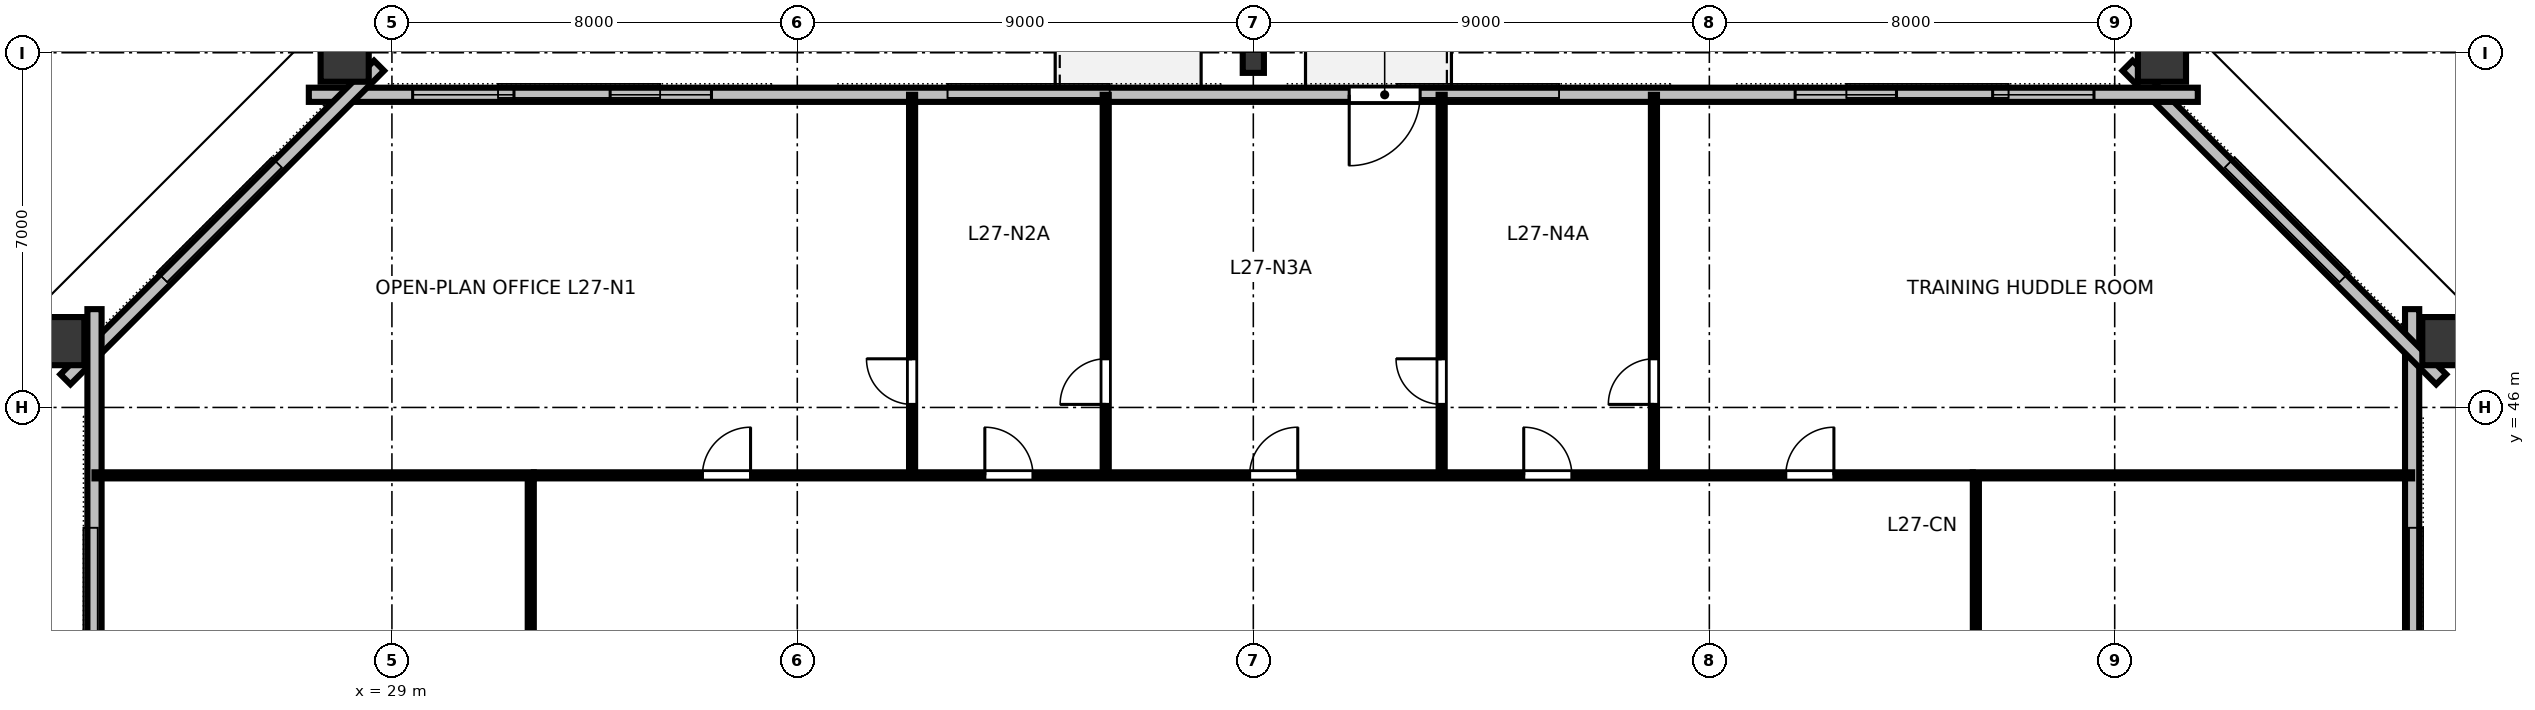
"""IFC4 building model, lengths in metres.
Left out: names, types, materials, properties, quantities, classifications, styles, units other than length and angle.
Written with IfcOpenShell. Run it as: python <this file> out.ifc"""

import sys

from ifc_helpers import new_model, si_unit, direction, frame, frame_2d, origin, origin_2d, place, context, subcontext, project, spatial, rectangle, hollow_rectangle, i_section, extrude, element, fill, save


model = new_model("IFC4")
c1 = context("Model", 3, precision=1e-05, world=origin(), true_north=direction((0.0, 1.0)))
c2 = subcontext(c1, "Body", "Model", "MODEL_VIEW")
j1 = project(units=[si_unit("LENGTHUNIT", "METRE"), si_unit("PLANEANGLEUNIT", "RADIAN")], contexts=[c1])
p1 = place(None, origin())
s1 = spatial("IfcSite", under=j1, at=p1, CompositionType="ELEMENT")
p2 = place(p1, origin())
s2 = spatial("IfcBuilding", under=s1, at=p2, CompositionType="ELEMENT")
p3 = place(p2, frame((0.0, 0.0, 106.0)))
s3 = spatial("IfcBuildingStorey", under=s2, at=p3, CompositionType="ELEMENT", Elevation=106.0)
for number, where, z_axis, x_axis in (
    (1, (69.646, 47.309, 0.0), (0.0, 0.0, 1.0), (0.0, 1.0, 0.0)),
    (2, (63.933, 53.002, 0.0), (0.0, 0.0, 1.0), (1.0, 0.0, 0.0)),
):
    element("IfcColumn", number, at=place(p3, frame(where, z_axis=z_axis, x_axis=x_axis)), inside=s3, PredefinedType="COLUMN", context=c2, shape_type="SweptSolid", body=[
        extrude(hollow_rectangle(XDim=0.95, YDim=1.15, WallThickness=0.06, at=origin_2d()), origin(), (0.0, 0.0, 1.0), 3.358),
    ])
p4 = place(p3, frame((46.0, 52.83, 0.0), z_axis=(0.0, 0.0, 1.0), x_axis=(1.0, 0.0, 0.0)))
e3 = element("IfcColumn", 3, at=p4, inside=s3, PredefinedType="COLUMN", context=c2, shape_type="SweptSolid", body=[
    extrude(i_section(OverallWidth=0.418, OverallDepth=0.455, WebThickness=0.042, FlangeThickness=0.068, FilletRadius=0.025, at=origin_2d()), origin(), (0.0, 0.0, 1.0), 3.358),
])
for number, where, z_axis, x_axis in (
    (4, (28.067, 53.002, 0.0), (0.0, 0.0, 1.0), (1.0, 0.0, 0.0)),
    (5, (22.354, 47.309, 0.0), (0.0, 0.0, 1.0), (0.0, 1.0, 0.0)),
):
    element("IfcColumn", number, at=place(p3, frame(where, z_axis=z_axis, x_axis=x_axis)), inside=s3, PredefinedType="COLUMN", context=c2, shape_type="SweptSolid", body=[
        extrude(hollow_rectangle(XDim=0.95, YDim=1.15, WallThickness=0.06, at=origin_2d()), origin(), (0.0, 0.0, 1.0), 3.358),
    ])
p5 = place(p3, frame((68.87, 16.06, 0.0), z_axis=(0.0, 0.0, 1.0), x_axis=(0.0, 1.0, 0.0)))
e6 = element("IfcWall", 6, at=p5, inside=s3, PredefinedType="STANDARD", context=c2, shape_type="SweptSolid", body=[
    extrude(rectangle(XDim=31.88, YDim=0.28, at=frame_2d((15.94, 0.0))), origin(), (0.0, 0.0, 1.0), 3.36),
])
p6 = place(p3, frame((69.444, 46.554, 0.0), z_axis=(0.0, 0.0, 1.0), x_axis=(-0.707106781187, 0.707106781187, 0.0)))
e7 = element("IfcWall", 7, at=p6, inside=s3, PredefinedType="STANDARD", context=c2, shape_type="SweptSolid", body=[
    extrude(rectangle(XDim=8.753, YDim=0.28, at=frame_2d((4.376, 0.0))), origin(), (0.0, 0.0, 1.0), 3.36),
])
p7 = place(p3, frame((64.64, 52.17, 0.0), z_axis=(0.0, 0.0, 1.0), x_axis=(-1.0, 0.0, 0.0)))
e8 = element("IfcWall", 8, at=p7, inside=s3, PredefinedType="STANDARD", context=c2, shape_type="SweptSolid", body=[
    extrude(rectangle(XDim=37.28, YDim=0.28, at=frame_2d((18.64, 0.0))), origin(), (0.0, 0.0, 1.0), 3.36),
])
p8 = place(p7, frame((15.347, 0.0, 0.0)))
e9 = element("IfcOpeningElement", 9, at=p8, cuts=e8, PredefinedType="OPENING", context=c2, shape_type="SweptSolid", body=[
    extrude(rectangle(XDim=1.4, YDim=2.15, at=frame_2d((0.7, 1.075))), frame((0.0, 0.15, 0.0), z_axis=(0.0, -1.0, 0.0), x_axis=(1.0, 0.0, 0.0)), (0.0, 0.0, 1.0), 0.3),
])
p9 = place(p7, frame((2.049, 0.0, 0.8)))
e10 = element("IfcOpeningElement", 10, at=p9, cuts=e8, PredefinedType="OPENING", context=c2, shape_type="SweptSolid", body=[
    extrude(rectangle(XDim=2.0, YDim=1.95, at=frame_2d((1.0, 0.975))), frame((0.0, 0.15, 0.0), z_axis=(0.0, -1.0, 0.0), x_axis=(1.0, 0.0, 0.0)), (0.0, 0.0, 1.0), 0.3),
])
p10 = place(p7, frame((5.947, 0.0, 0.8)))
e11 = element("IfcOpeningElement", 11, at=p10, cuts=e8, PredefinedType="OPENING", context=c2, shape_type="SweptSolid", body=[
    extrude(rectangle(XDim=2.0, YDim=1.95, at=frame_2d((1.0, 0.975))), frame((0.0, 0.15, 0.0), z_axis=(0.0, -1.0, 0.0), x_axis=(1.0, 0.0, 0.0)), (0.0, 0.0, 1.0), 0.3),
])
p11 = place(p7, frame((29.333, 0.0, 0.8)))
e12 = element("IfcOpeningElement", 12, at=p11, cuts=e8, PredefinedType="OPENING", context=c2, shape_type="SweptSolid", body=[
    extrude(rectangle(XDim=2.0, YDim=1.95, at=frame_2d((1.0, 0.975))), frame((0.0, 0.15, 0.0), z_axis=(0.0, -1.0, 0.0), x_axis=(1.0, 0.0, 0.0)), (0.0, 0.0, 1.0), 0.3),
])
p12 = place(p7, frame((33.231, 0.0, 0.8)))
e13 = element("IfcOpeningElement", 13, at=p12, cuts=e8, PredefinedType="OPENING", context=c2, shape_type="SweptSolid", body=[
    extrude(rectangle(XDim=2.0, YDim=1.95, at=frame_2d((1.0, 0.975))), frame((0.0, 0.15, 0.0), z_axis=(0.0, -1.0, 0.0), x_axis=(1.0, 0.0, 0.0)), (0.0, 0.0, 1.0), 0.3),
])
p13 = place(p3, frame((28.746, 52.744, 0.0), z_axis=(0.0, 0.0, 1.0), x_axis=(-0.707106781187, -0.707106781187, 0.0)))
e14 = element("IfcWall", 14, at=p13, inside=s3, PredefinedType="STANDARD", context=c2, shape_type="SweptSolid", body=[
    extrude(rectangle(XDim=8.753, YDim=0.28, at=frame_2d((4.376, 0.0))), origin(), (0.0, 0.0, 1.0), 3.36),
])
p14 = place(p3, frame((23.13, 47.94, 0.0), z_axis=(0.0, 0.0, 1.0), x_axis=(0.0, -1.0, 0.0)))
e15 = element("IfcWall", 15, at=p14, inside=s3, PredefinedType="STANDARD", context=c2, shape_type="SweptSolid", body=[
    extrude(rectangle(XDim=31.88, YDim=0.28, at=frame_2d((15.94, 0.0))), origin(), (0.0, 0.0, 1.0), 3.36),
])
p15 = place(p3, frame((39.266, 44.66, 0.0), z_axis=(0.0, 0.0, 1.0), x_axis=(0.0, 1.0, 0.0)))
e16 = element("IfcWall", 16, at=p15, inside=s3, PredefinedType="PARTITIONING", context=c2, shape_type="SweptSolid", body=[
    extrude(rectangle(XDim=7.51, YDim=0.12, at=frame_2d((3.755, 0.0))), origin(), (0.0, 0.0, 1.0), 2.64),
])
p16 = place(p15, frame((1.4, 0.0, 0.0)))
e17 = element("IfcOpeningElement", 17, at=p16, cuts=e16, PredefinedType="OPENING", context=c2, shape_type="SweptSolid", body=[
    extrude(rectangle(XDim=0.9, YDim=2.15, at=frame_2d((0.45, 1.075))), frame((0.0, 0.07, 0.0), z_axis=(0.0, -1.0, 0.0), x_axis=(1.0, 0.0, 0.0)), (0.0, 0.0, 1.0), 0.14),
])
p17 = place(p3, frame((43.087, 44.66, 0.0), z_axis=(0.0, 0.0, 1.0), x_axis=(0.0, 1.0, 0.0)))
e18 = element("IfcWall", 18, at=p17, inside=s3, PredefinedType="PARTITIONING", context=c2, shape_type="SweptSolid", body=[
    extrude(rectangle(XDim=7.51, YDim=0.12, at=frame_2d((3.755, 0.0))), origin(), (0.0, 0.0, 1.0), 2.64),
])
p18 = place(p17, frame((1.4, 0.0, 0.0)))
e19 = element("IfcOpeningElement", 19, at=p18, cuts=e18, PredefinedType="OPENING", context=c2, shape_type="SweptSolid", body=[
    extrude(rectangle(XDim=0.9, YDim=2.15, at=frame_2d((0.45, 1.075))), frame((0.0, 0.07, 0.0), z_axis=(0.0, -1.0, 0.0), x_axis=(1.0, 0.0, 0.0)), (0.0, 0.0, 1.0), 0.14),
])
p19 = place(p3, frame((49.717, 44.66, 0.0), z_axis=(0.0, 0.0, 1.0), x_axis=(0.0, 1.0, 0.0)))
e20 = element("IfcWall", 20, at=p19, inside=s3, PredefinedType="PARTITIONING", context=c2, shape_type="SweptSolid", body=[
    extrude(rectangle(XDim=7.51, YDim=0.12, at=frame_2d((3.755, 0.0))), origin(), (0.0, 0.0, 1.0), 2.64),
])
p20 = place(p19, frame((1.4, 0.0, 0.0)))
e21 = element("IfcOpeningElement", 21, at=p20, cuts=e20, PredefinedType="OPENING", context=c2, shape_type="SweptSolid", body=[
    extrude(rectangle(XDim=0.9, YDim=2.15, at=frame_2d((0.45, 1.075))), frame((0.0, 0.07, 0.0), z_axis=(0.0, -1.0, 0.0), x_axis=(1.0, 0.0, 0.0)), (0.0, 0.0, 1.0), 0.14),
])
p21 = place(p3, frame((53.906, 44.66, 0.0), z_axis=(0.0, 0.0, 1.0), x_axis=(0.0, 1.0, 0.0)))
e22 = element("IfcWall", 22, at=p21, inside=s3, PredefinedType="PARTITIONING", context=c2, shape_type="SweptSolid", body=[
    extrude(rectangle(XDim=7.51, YDim=0.12, at=frame_2d((3.755, 0.0))), origin(), (0.0, 0.0, 1.0), 2.64),
])
p22 = place(p21, frame((1.4, 0.0, 0.0)))
e23 = element("IfcOpeningElement", 23, at=p22, cuts=e22, PredefinedType="OPENING", context=c2, shape_type="SweptSolid", body=[
    extrude(rectangle(XDim=0.9, YDim=2.15, at=frame_2d((0.45, 1.075))), frame((0.0, 0.07, 0.0), z_axis=(0.0, -1.0, 0.0), x_axis=(1.0, 0.0, 0.0)), (0.0, 0.0, 1.0), 0.14),
])
p23 = place(p3, frame((31.8, 44.66, 0.0), z_axis=(0.0, 0.0, 1.0), x_axis=(1.0, 0.0, 0.0)))
e24 = element("IfcWall", 24, at=p23, inside=s3, PredefinedType="PARTITIONING", context=c2, shape_type="SweptSolid", body=[
    extrude(rectangle(XDim=28.4, YDim=0.12, at=frame_2d((14.2, 0.0))), origin(), (0.0, 0.0, 1.0), 2.64),
])
p24 = place(p23, frame((3.328, 0.0, 0.0)))
e25 = element("IfcOpeningElement", 25, at=p24, cuts=e24, PredefinedType="OPENING", context=c2, shape_type="SweptSolid", body=[
    extrude(rectangle(XDim=0.95, YDim=2.15, at=frame_2d((0.475, 1.075))), frame((0.0, 0.07, 0.0), z_axis=(0.0, -1.0, 0.0), x_axis=(1.0, 0.0, 0.0)), (0.0, 0.0, 1.0), 0.14),
])
p25 = place(p23, frame((8.901, 0.0, 0.0)))
e26 = element("IfcOpeningElement", 26, at=p25, cuts=e24, PredefinedType="OPENING", context=c2, shape_type="SweptSolid", body=[
    extrude(rectangle(XDim=0.95, YDim=2.15, at=frame_2d((0.475, 1.075))), frame((0.0, 0.07, 0.0), z_axis=(0.0, -1.0, 0.0), x_axis=(1.0, 0.0, 0.0)), (0.0, 0.0, 1.0), 0.14),
])
p26 = place(p23, frame((14.127, 0.0, 0.0)))
e27 = element("IfcOpeningElement", 27, at=p26, cuts=e24, PredefinedType="OPENING", context=c2, shape_type="SweptSolid", body=[
    extrude(rectangle(XDim=0.95, YDim=2.15, at=frame_2d((0.475, 1.075))), frame((0.0, 0.07, 0.0), z_axis=(0.0, -1.0, 0.0), x_axis=(1.0, 0.0, 0.0)), (0.0, 0.0, 1.0), 0.14),
])
p27 = place(p23, frame((19.537, 0.0, 0.0)))
e28 = element("IfcOpeningElement", 28, at=p27, cuts=e24, PredefinedType="OPENING", context=c2, shape_type="SweptSolid", body=[
    extrude(rectangle(XDim=0.95, YDim=2.15, at=frame_2d((0.475, 1.075))), frame((0.0, 0.07, 0.0), z_axis=(0.0, -1.0, 0.0), x_axis=(1.0, 0.0, 0.0)), (0.0, 0.0, 1.0), 0.14),
])
p28 = place(p23, frame((24.708, 0.0, 0.0)))
e29 = element("IfcOpeningElement", 29, at=p28, cuts=e24, PredefinedType="OPENING", context=c2, shape_type="SweptSolid", body=[
    extrude(rectangle(XDim=0.95, YDim=2.15, at=frame_2d((0.475, 1.075))), frame((0.0, 0.07, 0.0), z_axis=(0.0, -1.0, 0.0), x_axis=(1.0, 0.0, 0.0)), (0.0, 0.0, 1.0), 0.14),
])
p29 = place(p3, frame((31.74, 33.02, 0.0), z_axis=(0.0, 0.0, 1.0), x_axis=(0.0, 1.0, 0.0)))
e30 = element("IfcWall", 30, at=p29, inside=s3, PredefinedType="PARTITIONING", context=c2, shape_type="SweptSolid", body=[
    extrude(rectangle(XDim=11.58, YDim=0.12, at=frame_2d((5.79, 0.0))), origin(), (0.0, 0.0, 1.0), 2.64),
])
p30 = place(p29, frame((5.215, 0.0, 0.0)))
e31 = element("IfcOpeningElement", 31, at=p30, cuts=e30, PredefinedType="OPENING", context=c2, shape_type="SweptSolid", body=[
    extrude(rectangle(XDim=0.95, YDim=2.15, at=frame_2d((0.475, 1.075))), frame((0.0, 0.07, 0.0), z_axis=(0.0, -1.0, 0.0), x_axis=(1.0, 0.0, 0.0)), (0.0, 0.0, 1.0), 0.14),
])
p31 = place(p3, frame((60.26, 33.02, 0.0), z_axis=(0.0, 0.0, 1.0), x_axis=(0.0, 1.0, 0.0)))
e32 = element("IfcWall", 32, at=p31, inside=s3, PredefinedType="PARTITIONING", context=c2, shape_type="SweptSolid", body=[
    extrude(rectangle(XDim=11.58, YDim=0.12, at=frame_2d((5.79, 0.0))), origin(), (0.0, 0.0, 1.0), 2.64),
])
p32 = place(p31, frame((5.337, 0.0, 0.0)))
e33 = element("IfcOpeningElement", 33, at=p32, cuts=e32, PredefinedType="OPENING", context=c2, shape_type="SweptSolid", body=[
    extrude(rectangle(XDim=0.95, YDim=2.15, at=frame_2d((0.475, 1.075))), frame((0.0, 0.07, 0.0), z_axis=(0.0, -1.0, 0.0), x_axis=(1.0, 0.0, 0.0)), (0.0, 0.0, 1.0), 0.14),
])
for number, where, z_axis, x_axis in (
    (34, (31.8, 44.66, 0.0), (0.0, 0.0, 1.0), (-1.0, 0.0, 0.0)),
    (35, (60.2, 44.66, 0.0), (0.0, 0.0, 1.0), (1.0, 0.0, 0.0)),
):
    element("IfcWall", number, at=place(p3, frame(where, z_axis=z_axis, x_axis=x_axis)), inside=s3, PredefinedType="PARTITIONING", context=c2, shape_type="SweptSolid", body=[
        extrude(rectangle(XDim=8.67, YDim=0.12, at=frame_2d((4.335, 0.0))), origin(), (0.0, 0.0, 1.0), 2.64),
    ])
p33 = place(p8, origin())
e36 = element("IfcDoor", 36, at=p33, inside=s3, OperationType="SINGLE_SWING_RIGHT", PredefinedType="DOOR", context=c2, shape_type="SweptSolid", body=[
    extrude(rectangle(XDim=1.4, YDim=2.15, at=frame_2d((0.7, 1.075))), frame((0.0, 0.025, 0.0), z_axis=(0.0, -1.0, 0.0), x_axis=(1.0, 0.0, 0.0)), (0.0, 0.0, 1.0), 0.05),
])
fill(e9, e36)
p34 = place(p9, origin())
e37 = element("IfcWindow", 37, at=p34, inside=s3, PartitioningType="SINGLE_PANEL", PredefinedType="WINDOW", context=c2, shape_type="SweptSolid", body=[
    extrude(rectangle(XDim=2.0, YDim=1.95, at=frame_2d((1.0, 0.975))), frame((0.0, 0.03, 0.0), z_axis=(0.0, -1.0, 0.0), x_axis=(1.0, 0.0, 0.0)), (0.0, 0.0, 1.0), 0.06),
])
fill(e10, e37)
p35 = place(p10, origin())
e38 = element("IfcWindow", 38, at=p35, inside=s3, PartitioningType="SINGLE_PANEL", PredefinedType="WINDOW", context=c2, shape_type="SweptSolid", body=[
    extrude(rectangle(XDim=2.0, YDim=1.95, at=frame_2d((1.0, 0.975))), frame((0.0, 0.03, 0.0), z_axis=(0.0, -1.0, 0.0), x_axis=(1.0, 0.0, 0.0)), (0.0, 0.0, 1.0), 0.06),
])
fill(e11, e38)
p36 = place(p11, origin())
e39 = element("IfcWindow", 39, at=p36, inside=s3, PartitioningType="SINGLE_PANEL", PredefinedType="WINDOW", context=c2, shape_type="SweptSolid", body=[
    extrude(rectangle(XDim=2.0, YDim=1.95, at=frame_2d((1.0, 0.975))), frame((0.0, 0.03, 0.0), z_axis=(0.0, -1.0, 0.0), x_axis=(1.0, 0.0, 0.0)), (0.0, 0.0, 1.0), 0.06),
])
fill(e12, e39)
p37 = place(p12, origin())
e40 = element("IfcWindow", 40, at=p37, inside=s3, PartitioningType="SINGLE_PANEL", PredefinedType="WINDOW", context=c2, shape_type="SweptSolid", body=[
    extrude(rectangle(XDim=2.0, YDim=1.95, at=frame_2d((1.0, 0.975))), frame((0.0, 0.03, 0.0), z_axis=(0.0, -1.0, 0.0), x_axis=(1.0, 0.0, 0.0)), (0.0, 0.0, 1.0), 0.06),
])
fill(e13, e40)
p38 = place(p16, origin())
e41 = element("IfcDoor", 41, at=p38, inside=s3, OperationType="SINGLE_SWING_RIGHT", PredefinedType="DOOR", context=c2, shape_type="SweptSolid", body=[
    extrude(rectangle(XDim=0.9, YDim=2.15, at=frame_2d((0.45, 1.075))), frame((0.0, 0.025, 0.0), z_axis=(0.0, -1.0, 0.0), x_axis=(1.0, 0.0, 0.0)), (0.0, 0.0, 1.0), 0.05),
])
fill(e17, e41)
p39 = place(p18, origin())
e42 = element("IfcDoor", 42, at=p39, inside=s3, OperationType="SINGLE_SWING_LEFT", PredefinedType="DOOR", context=c2, shape_type="SweptSolid", body=[
    extrude(rectangle(XDim=0.9, YDim=2.15, at=frame_2d((0.45, 1.075))), frame((0.0, 0.025, 0.0), z_axis=(0.0, -1.0, 0.0), x_axis=(1.0, 0.0, 0.0)), (0.0, 0.0, 1.0), 0.05),
])
fill(e19, e42)
p40 = place(p20, origin())
e43 = element("IfcDoor", 43, at=p40, inside=s3, OperationType="SINGLE_SWING_RIGHT", PredefinedType="DOOR", context=c2, shape_type="SweptSolid", body=[
    extrude(rectangle(XDim=0.9, YDim=2.15, at=frame_2d((0.45, 1.075))), frame((0.0, 0.025, 0.0), z_axis=(0.0, -1.0, 0.0), x_axis=(1.0, 0.0, 0.0)), (0.0, 0.0, 1.0), 0.05),
])
fill(e21, e43)
p41 = place(p22, origin())
e44 = element("IfcDoor", 44, at=p41, inside=s3, OperationType="SINGLE_SWING_LEFT", PredefinedType="DOOR", context=c2, shape_type="SweptSolid", body=[
    extrude(rectangle(XDim=0.9, YDim=2.15, at=frame_2d((0.45, 1.075))), frame((0.0, 0.025, 0.0), z_axis=(0.0, -1.0, 0.0), x_axis=(1.0, 0.0, 0.0)), (0.0, 0.0, 1.0), 0.05),
])
fill(e23, e44)
p42 = place(p24, origin())
e45 = element("IfcDoor", 45, at=p42, inside=s3, OperationType="SINGLE_SWING_RIGHT", PredefinedType="DOOR", context=c2, shape_type="SweptSolid", body=[
    extrude(rectangle(XDim=0.95, YDim=2.15, at=frame_2d((0.475, 1.075))), frame((0.0, 0.025, 0.0), z_axis=(0.0, -1.0, 0.0), x_axis=(1.0, 0.0, 0.0)), (0.0, 0.0, 1.0), 0.05),
])
fill(e25, e45)
p43 = place(p25, origin())
e46 = element("IfcDoor", 46, at=p43, inside=s3, OperationType="SINGLE_SWING_LEFT", PredefinedType="DOOR", context=c2, shape_type="SweptSolid", body=[
    extrude(rectangle(XDim=0.95, YDim=2.15, at=frame_2d((0.475, 1.075))), frame((0.0, 0.025, 0.0), z_axis=(0.0, -1.0, 0.0), x_axis=(1.0, 0.0, 0.0)), (0.0, 0.0, 1.0), 0.05),
])
fill(e26, e46)
p44 = place(p26, origin())
e47 = element("IfcDoor", 47, at=p44, inside=s3, OperationType="SINGLE_SWING_RIGHT", PredefinedType="DOOR", context=c2, shape_type="SweptSolid", body=[
    extrude(rectangle(XDim=0.95, YDim=2.15, at=frame_2d((0.475, 1.075))), frame((0.0, 0.025, 0.0), z_axis=(0.0, -1.0, 0.0), x_axis=(1.0, 0.0, 0.0)), (0.0, 0.0, 1.0), 0.05),
])
fill(e27, e47)
p45 = place(p27, origin())
e48 = element("IfcDoor", 48, at=p45, inside=s3, OperationType="SINGLE_SWING_LEFT", PredefinedType="DOOR", context=c2, shape_type="SweptSolid", body=[
    extrude(rectangle(XDim=0.95, YDim=2.15, at=frame_2d((0.475, 1.075))), frame((0.0, 0.025, 0.0), z_axis=(0.0, -1.0, 0.0), x_axis=(1.0, 0.0, 0.0)), (0.0, 0.0, 1.0), 0.05),
])
fill(e28, e48)
p46 = place(p28, origin())
e49 = element("IfcDoor", 49, at=p46, inside=s3, OperationType="SINGLE_SWING_RIGHT", PredefinedType="DOOR", context=c2, shape_type="SweptSolid", body=[
    extrude(rectangle(XDim=0.95, YDim=2.15, at=frame_2d((0.475, 1.075))), frame((0.0, 0.025, 0.0), z_axis=(0.0, -1.0, 0.0), x_axis=(1.0, 0.0, 0.0)), (0.0, 0.0, 1.0), 0.05),
])
fill(e29, e49)
save(model, sys.argv[1])
